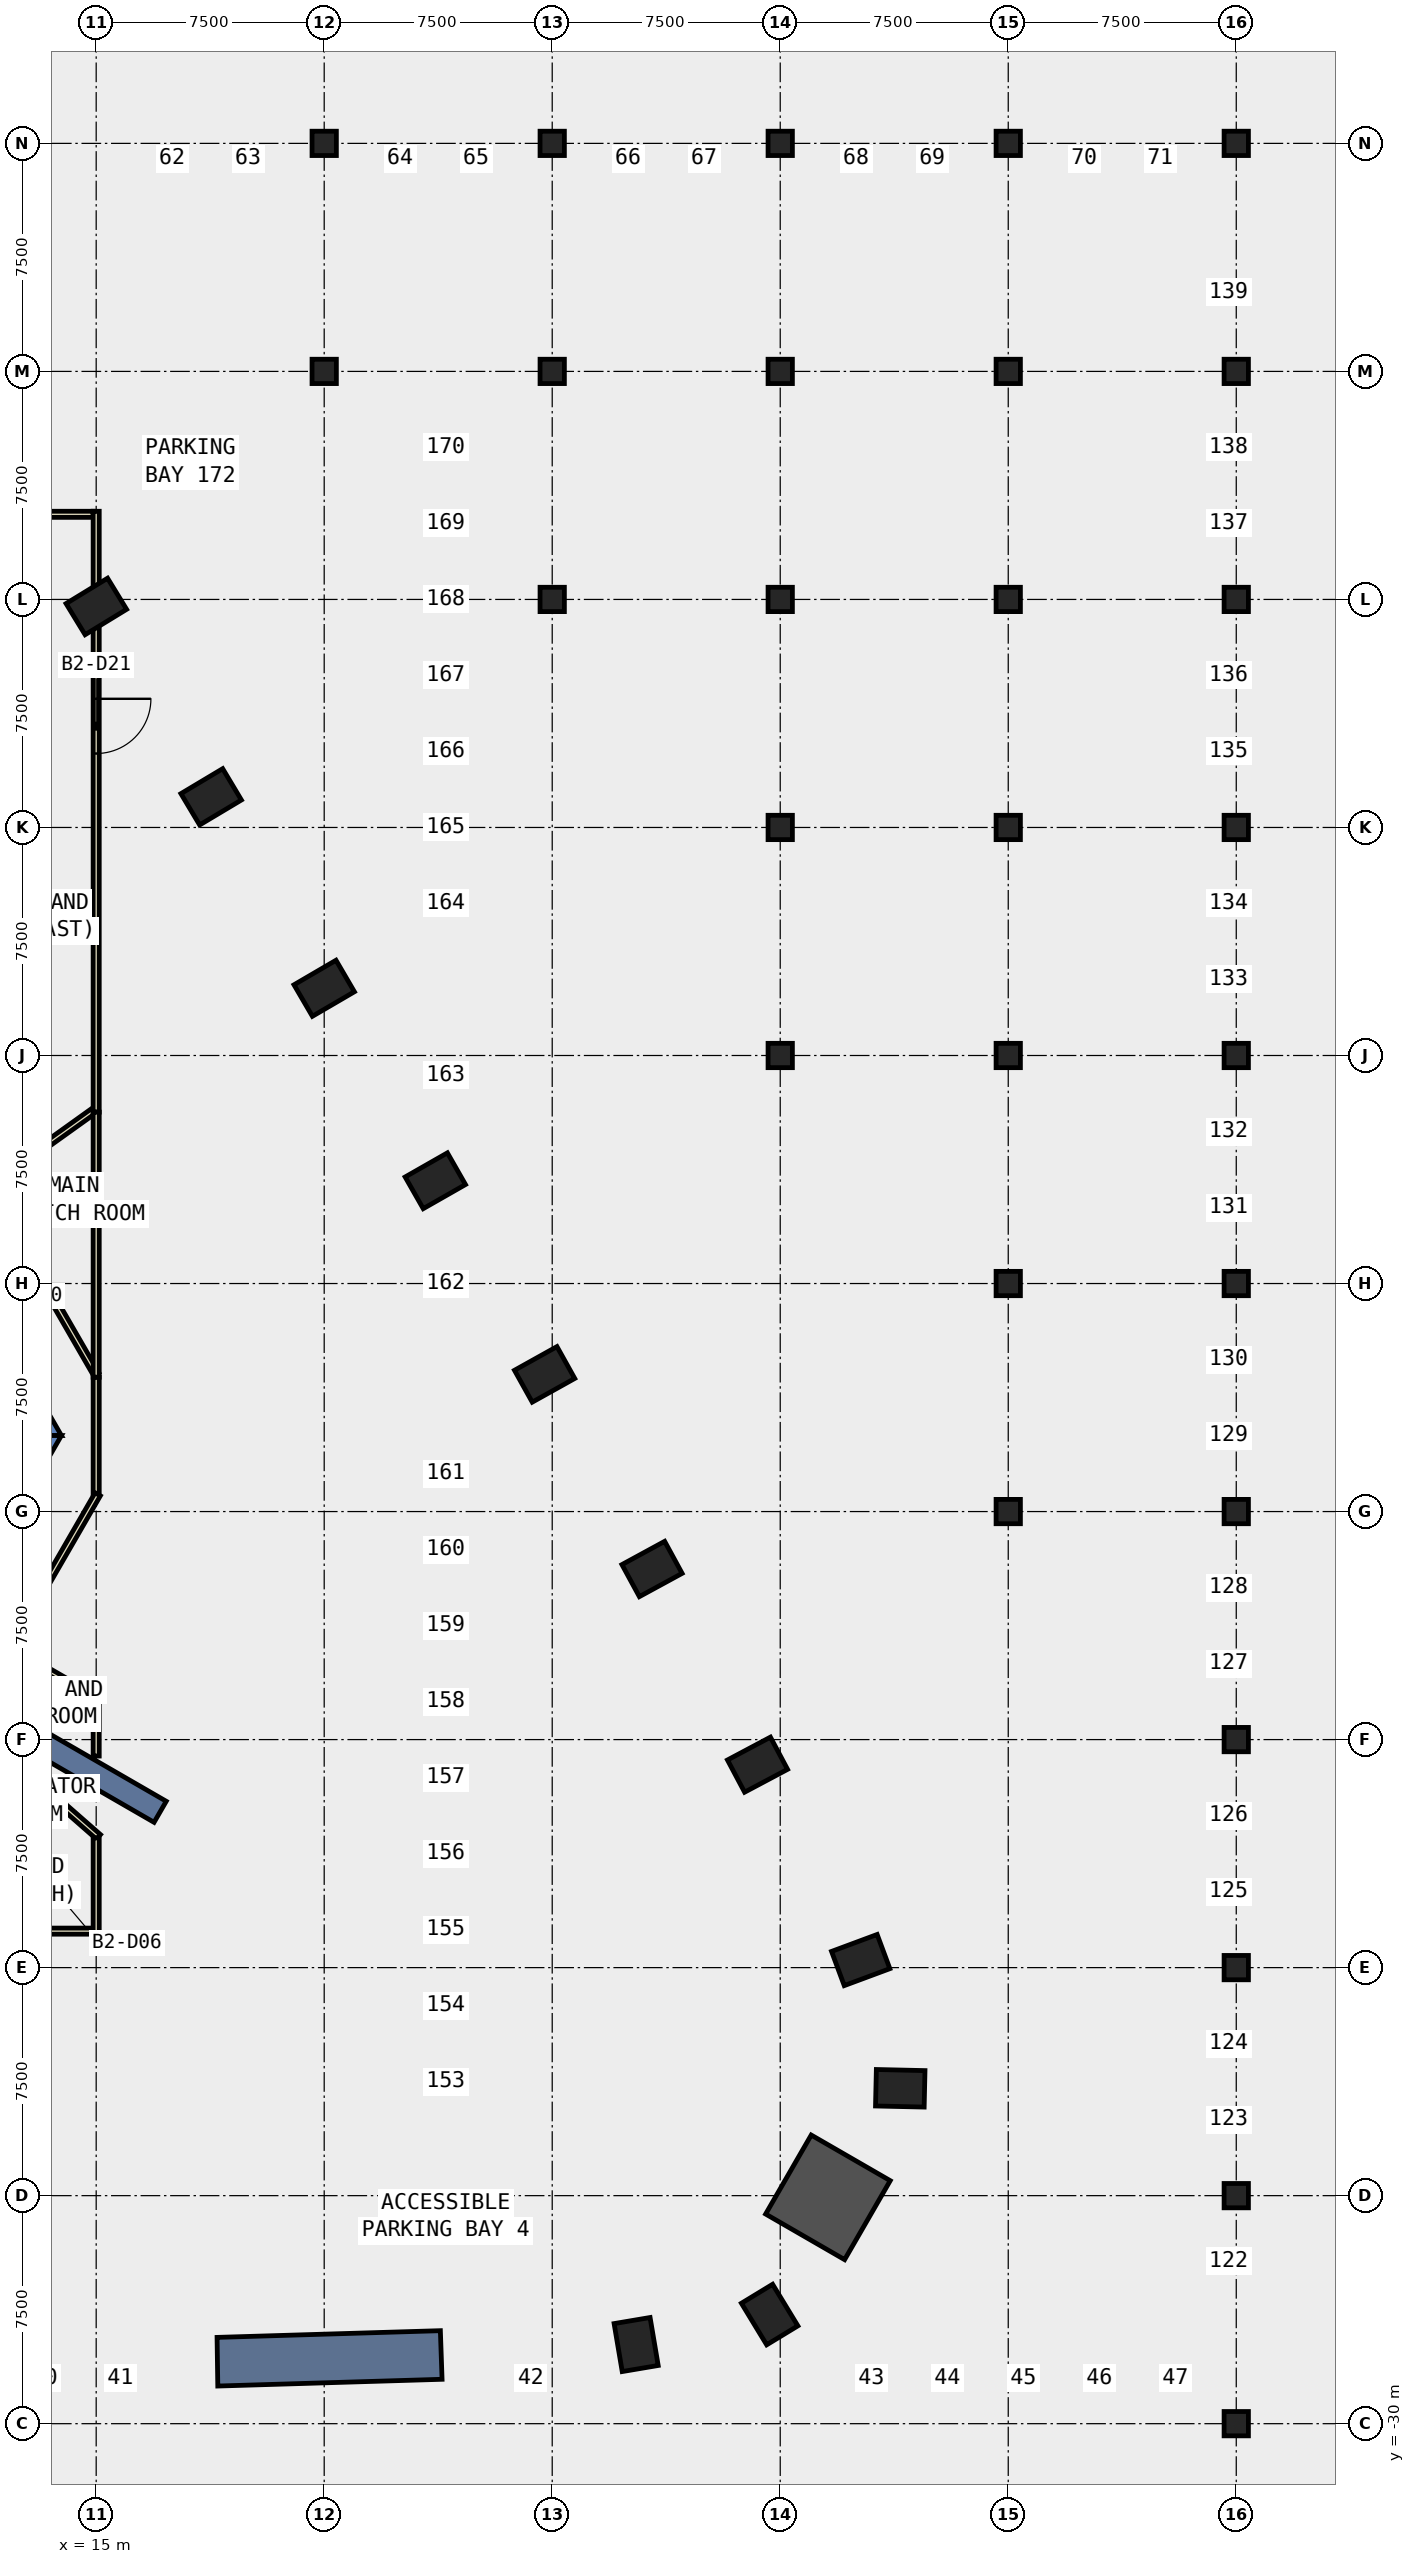
"""IFC4 building model, lengths in metres.
Left out: names, types, materials, properties, quantities, classifications, styles, units other than length and angle.
Written with IfcOpenShell. Run it as: python <this file> out.ifc"""

import sys

from ifc_helpers import new_model, si_unit, direction, frame, frame_2d, origin, origin_2d, place, context, subcontext, project, spatial, polyline, rectangle, outline, extrude, element, fill, save


model = new_model("IFC4")
c1 = context("Model", 3, precision=1e-05, world=origin(), true_north=direction((0.0, 1.0)))
c2 = subcontext(c1, "Body", "Model", "MODEL_VIEW")
j1 = project(units=[si_unit("LENGTHUNIT", "METRE"), si_unit("PLANEANGLEUNIT", "RADIAN")], contexts=[c1])
p1 = place(None, origin())
s1 = spatial("IfcSite", under=j1, at=p1, CompositionType="ELEMENT")
p2 = place(p1, origin())
s2 = spatial("IfcBuilding", under=s1, at=p2, CompositionType="ELEMENT")
p3 = place(p2, frame((0.0, 0.0, -11.0)))
s3 = spatial("IfcBuildingStorey", under=s2, at=p3, CompositionType="ELEMENT", Elevation=-11.0)
for number, where, z_axis, x_axis in (
    (1, (22.5, 37.5, -0.42), (0.0, 0.0, 1.0), (1.0, 0.0, 0.0)),
    (2, (22.5, 45.0, -0.42), (0.0, 0.0, 1.0), (1.0, 0.0, 0.0)),
    (3, (30.0, 30.0, -0.42), (0.0, 0.0, 1.0), (1.0, 0.0, 0.0)),
    (4, (30.0, 37.5, -0.42), (0.0, 0.0, 1.0), (1.0, 0.0, 0.0)),
    (5, (30.0, 45.0, -0.42), (0.0, 0.0, 1.0), (1.0, 0.0, 0.0)),
    (6, (37.5, 15.0, -0.42), (0.0, 0.0, 1.0), (1.0, 0.0, 0.0)),
    (7, (37.5, 22.5, -0.42), (0.0, 0.0, 1.0), (1.0, 0.0, 0.0)),
    (8, (37.5, 30.0, -0.42), (0.0, 0.0, 1.0), (1.0, 0.0, 0.0)),
    (9, (37.5, 37.5, -0.42), (0.0, 0.0, 1.0), (1.0, 0.0, 0.0)),
    (10, (37.5, 45.0, -0.42), (0.0, 0.0, 1.0), (1.0, 0.0, 0.0)),
    (11, (45.0, 0.0, -0.42), (0.0, 0.0, 1.0), (1.0, 0.0, 0.0)),
    (12, (45.0, 7.5, -0.42), (0.0, 0.0, 1.0), (1.0, 0.0, 0.0)),
    (13, (45.0, 15.0, -0.42), (0.0, 0.0, 1.0), (1.0, 0.0, 0.0)),
    (14, (45.0, 22.5, -0.42), (0.0, 0.0, 1.0), (1.0, 0.0, 0.0)),
    (15, (45.0, 30.0, -0.42), (0.0, 0.0, 1.0), (1.0, 0.0, 0.0)),
    (16, (45.0, 37.5, -0.42), (0.0, 0.0, 1.0), (1.0, 0.0, 0.0)),
    (17, (45.0, 45.0, -0.42), (0.0, 0.0, 1.0), (1.0, 0.0, 0.0)),
    (18, (52.5, -30.0, -0.42), (0.0, 0.0, 1.0), (1.0, 0.0, 0.0)),
    (19, (52.5, -22.5, -0.42), (0.0, 0.0, 1.0), (1.0, 0.0, 0.0)),
    (20, (52.5, -15.0, -0.42), (0.0, 0.0, 1.0), (1.0, 0.0, 0.0)),
    (21, (52.5, -7.5, -0.42), (0.0, 0.0, 1.0), (1.0, 0.0, 0.0)),
    (22, (52.5, 0.0, -0.42), (0.0, 0.0, 1.0), (1.0, 0.0, 0.0)),
    (23, (52.5, 7.5, -0.42), (0.0, 0.0, 1.0), (1.0, 0.0, 0.0)),
    (24, (52.5, 15.0, -0.42), (0.0, 0.0, 1.0), (1.0, 0.0, 0.0)),
    (25, (52.5, 22.5, -0.42), (0.0, 0.0, 1.0), (1.0, 0.0, 0.0)),
    (26, (52.5, 30.0, -0.42), (0.0, 0.0, 1.0), (1.0, 0.0, 0.0)),
    (27, (52.5, 37.5, -0.42), (0.0, 0.0, 1.0), (1.0, 0.0, 0.0)),
    (28, (52.5, 45.0, -0.42), (0.0, 0.0, 1.0), (1.0, 0.0, 0.0)),
):
    element("IfcColumn", number, at=place(p3, frame(where, z_axis=z_axis, x_axis=x_axis)), inside=s3, PredefinedType="COLUMN", context=c2, shape_type="SweptSolid", body=[
        extrude(rectangle(XDim=0.8, YDim=0.8, at=origin_2d()), origin(), (0.0, 0.0, 1.0), 5.5),
    ])
for number, where, z_axis, x_axis in (
    (29, (32.761, -27.397, -0.42), (0.0, 0.0, 1.0), (0.986, 0.167, 0.0)),
    (30, (37.152, -26.411, -0.42), (0.0, 0.0, 1.0), (0.855, 0.519, 0.0)),
):
    element("IfcColumn", number, at=place(p3, frame(where, z_axis=z_axis, x_axis=x_axis)), inside=s3, PredefinedType="COLUMN", context=c2, shape_type="SweptSolid", body=[
        extrude(rectangle(XDim=1.2, YDim=1.6, at=origin_2d()), origin(), (0.0, 0.0, 1.0), 5.5),
    ])
p4 = place(p3, frame((39.069, -22.556, -0.42), z_axis=(0.0, 0.0, 1.0), x_axis=(-0.866025403784, 0.5, 0.0)))
e31 = element("IfcColumn", 31, at=p4, inside=s3, PredefinedType="COLUMN", context=c2, shape_type="SweptSolid", body=[
    extrude(rectangle(XDim=3.0, YDim=3.0, at=origin_2d()), origin(), (0.0, 0.0, 1.0), 5.5),
])
for number, where, z_axis, x_axis in (
    (32, (41.448, -18.969, -0.42), (0.0, 0.0, 1.0), (0.023, 1.0, 0.0)),
    (33, (40.147, -14.751, -0.42), (0.0, 0.0, 1.0), (-0.348, 0.937, 0.0)),
    (34, (36.753, -8.325, -0.42), (0.0, 0.0, 1.0), (-0.469, 0.883, 0.0)),
    (35, (33.283, -1.889, -0.42), (0.0, 0.0, 1.0), (-0.478, 0.878, 0.0)),
    (36, (29.75, 4.512, -0.42), (0.0, 0.0, 1.0), (-0.487, 0.873, 0.0)),
    (37, (26.155, 10.88, -0.42), (0.0, 0.0, 1.0), (-0.496, 0.869, 0.0)),
    (38, (22.5, 17.211, -0.42), (0.0, 0.0, 1.0), (-0.504, 0.864, 0.0)),
    (39, (18.782, 23.508, -0.42), (0.0, 0.0, 1.0), (-0.513, 0.858, 0.0)),
    (40, (15.005, 29.769, -0.42), (0.0, 0.0, 1.0), (-0.522, 0.853, 0.0)),
):
    element("IfcColumn", number, at=place(p3, frame(where, z_axis=z_axis, x_axis=x_axis)), inside=s3, PredefinedType="COLUMN", context=c2, shape_type="SweptSolid", body=[
        extrude(rectangle(XDim=1.2, YDim=1.6, at=origin_2d()), origin(), (0.0, 0.0, 1.0), 5.5),
    ])
p5 = place(p3, frame((0.0, 0.0, -0.42)))
e41 = element("IfcWall", 41, at=p5, inside=s3, PredefinedType="SHEAR", context=c2, shape_type="SweptSolid", body=[
    extrude(outline(polyline([(19.0, -28.762), (26.377, -28.54), (26.321, -26.941), (18.976, -27.162), (19.0, -28.762)])), origin(), (0.0, 0.0, 1.0), 5.5),
])
p6 = place(p3, frame((0.0, 0.0, -0.42)))
e42 = element("IfcWall", 42, at=p6, inside=s3, PredefinedType="SHEAR", context=c2, shape_type="SweptSolid", body=[
    extrude(outline(polyline([(8.517, 11.748), (7.651, 11.248), (12.702, 2.5), (13.856, 2.5), (8.517, 11.748)])), origin(), (0.0, 0.0, 1.0), 5.5),
])
p7 = place(p3, frame((0.0, 0.0, -0.42)))
e43 = element("IfcWall", 43, at=p7, inside=s3, PredefinedType="SHEAR", context=c2, shape_type="SweptSolid", body=[
    extrude(outline(polyline([(6.928, -9.5), (13.856, 2.5), (12.702, 2.5), (6.351, -8.5), (6.928, -9.5)])), origin(), (0.0, 0.0, 1.0), 5.5),
])
p8 = place(p3, frame((9.31, -5.375, -0.42), z_axis=(0.0, 0.0, 1.0), x_axis=(0.866017533419, -0.500013631625, 0.0)))
e44 = element("IfcWall", 44, at=p8, inside=s3, PredefinedType="SHEAR", context=c2, shape_type="SweptSolid", body=[
    extrude(rectangle(XDim=9.0, YDim=0.8, at=frame_2d((4.5, 0.0))), origin(), (0.0, 0.0, 1.0), 5.5),
])
p9 = place(p3, frame((14.9, -13.8, 0.0), z_axis=(0.0, 0.0, 1.0), x_axis=(-1.0, 0.0, 0.0)))
e45 = element("IfcWall", 45, at=p9, inside=s3, PredefinedType="PARTITIONING", context=c2, shape_type="SweptSolid", body=[
    extrude(rectangle(XDim=2.249, YDim=0.2, at=frame_2d((1.125, 0.0))), origin(), (0.0, 0.0, 1.0), 5.05),
])
p10 = place(p3, frame((10.663, -6.835, 0.0), z_axis=(0.0, 0.0, 1.0), x_axis=(0.752269740493, -0.658855247788, 0.0)))
e46 = element("IfcWall", 46, at=p10, inside=s3, PredefinedType="PARTITIONING", context=c2, shape_type="SweptSolid", body=[
    extrude(rectangle(XDim=5.865, YDim=0.2, at=frame_2d((2.932, 0.0))), origin(), (0.0, 0.0, 1.0), 5.05),
])
p11 = place(p3, frame((15.0, -10.733, 0.0), z_axis=(0.0, 0.0, 1.0), x_axis=(0.0, -1.0, 0.0)))
e47 = element("IfcWall", 47, at=p11, inside=s3, PredefinedType="PARTITIONING", context=c2, shape_type="SweptSolid", body=[
    extrude(rectangle(XDim=3.167, YDim=0.2, at=frame_2d((1.583, 0.0))), origin(), (0.0, 0.0, 1.0), 5.05),
])
p12 = place(p3, frame((12.124, -4.5, 0.0), z_axis=(0.0, 0.0, 1.0), x_axis=(0.866109535743, -0.499854250852, 0.0)))
e48 = element("IfcWall", 48, at=p12, inside=s3, PredefinedType="PARTITIONING", context=c2, shape_type="SweptSolid", body=[
    extrude(rectangle(XDim=3.421, YDim=0.2, at=frame_2d((1.71, 0.0))), origin(), (0.0, 0.0, 1.0), 5.05),
])
p13 = place(p3, frame((15.0, -6.26, 0.0), z_axis=(0.0, 0.0, 1.0), x_axis=(0.0, -1.0, 0.0)))
e49 = element("IfcWall", 49, at=p13, inside=s3, PredefinedType="PARTITIONING", context=c2, shape_type="SweptSolid", body=[
    extrude(rectangle(XDim=1.781, YDim=0.2, at=frame_2d((0.891, 0.0))), origin(), (0.0, 0.0, 1.0), 5.05),
])
p14 = place(p3, frame((11.499, 10.583, 0.0), z_axis=(0.0, 0.0, 1.0), x_axis=(0.499994090379, -0.866028815679, 0.0)))
e50 = element("IfcWall", 50, at=p14, inside=s3, PredefinedType="PARTITIONING", context=c2, shape_type="SweptSolid", body=[
    extrude(rectangle(XDim=7.002, YDim=0.2, at=frame_2d((3.501, 0.0))), origin(), (0.0, 0.0, 1.0), 5.05),
])
p15 = place(p14, frame((1.952, 0.0, 0.0)))
e51 = element("IfcOpeningElement", 51, at=p15, cuts=e50, PredefinedType="OPENING", context=c2, shape_type="SweptSolid", body=[
    extrude(rectangle(XDim=1.0, YDim=2.1, at=frame_2d((0.5, 1.05))), frame((0.0, 0.11, 0.0), z_axis=(0.0, -1.0, 0.0), x_axis=(1.0, 0.0, 0.0)), (0.0, 0.0, 1.0), 0.22),
])
p16 = place(p3, frame((15.0, 4.419, 0.0), z_axis=(0.0, 0.0, 1.0), x_axis=(0.0, -1.0, 0.0)))
e52 = element("IfcWall", 52, at=p16, inside=s3, PredefinedType="PARTITIONING", context=c2, shape_type="SweptSolid", body=[
    extrude(rectangle(XDim=3.838, YDim=0.2, at=frame_2d((1.919, 0.0))), origin(), (0.0, 0.0, 1.0), 5.05),
])
p17 = place(p3, frame((15.05, 0.568, 0.0), z_axis=(0.0, 0.0, 1.0), x_axis=(-0.500047946832, -0.865997719899, 0.0)))
e53 = element("IfcWall", 53, at=p17, inside=s3, PredefinedType="PARTITIONING", context=c2, shape_type="SweptSolid", body=[
    extrude(rectangle(XDim=5.952, YDim=0.2, at=frame_2d((2.976, 0.0))), origin(), (0.0, 0.0, 1.0), 5.05),
])
p18 = place(p3, frame((14.919, 13.18, 0.0), z_axis=(0.0, 0.0, 1.0), x_axis=(-0.81313339858, -0.582077379833, 0.0)))
e54 = element("IfcWall", 54, at=p18, inside=s3, PredefinedType="PARTITIONING", context=c2, shape_type="SweptSolid", body=[
    extrude(rectangle(XDim=3.879, YDim=0.2, at=frame_2d((1.939, 0.0))), origin(), (0.0, 0.0, 1.0), 5.05),
])
p19 = place(p3, frame((12.59, 32.8, 0.0), z_axis=(0.0, 0.0, 1.0), x_axis=(1.0, 0.0, 0.0)))
e55 = element("IfcWall", 55, at=p19, inside=s3, PredefinedType="PARTITIONING", context=c2, shape_type="SweptSolid", body=[
    extrude(rectangle(XDim=2.31, YDim=0.2, at=frame_2d((1.155, 0.0))), origin(), (0.0, 0.0, 1.0), 5.05),
])
p20 = place(p3, frame((15.0, 32.9, 0.0), z_axis=(0.0, 0.0, 1.0), x_axis=(0.0, -1.0, 0.0)))
e56 = element("IfcWall", 56, at=p20, inside=s3, PredefinedType="PARTITIONING", context=c2, shape_type="SweptSolid", body=[
    extrude(rectangle(XDim=19.762, YDim=0.2, at=frame_2d((9.881, 0.0))), origin(), (0.0, 0.0, 1.0), 5.05),
])
p21 = place(p20, frame((6.168, 0.0, 0.0)))
e57 = element("IfcOpeningElement", 57, at=p21, cuts=e56, PredefinedType="OPENING", context=c2, shape_type="SweptSolid", body=[
    extrude(rectangle(XDim=1.8, YDim=2.1, at=frame_2d((0.9, 1.05))), frame((0.0, 0.11, 0.0), z_axis=(0.0, -1.0, 0.0), x_axis=(1.0, 0.0, 0.0)), (0.0, 0.0, 1.0), 0.22),
])
p22 = place(p3, frame((15.0, 13.138, 0.0), z_axis=(0.0, 0.0, 1.0), x_axis=(0.0, -1.0, 0.0)))
e58 = element("IfcWall", 58, at=p22, inside=s3, PredefinedType="PARTITIONING", context=c2, shape_type="SweptSolid", body=[
    extrude(rectangle(XDim=8.719, YDim=0.2, at=frame_2d((4.359, 0.0))), origin(), (0.0, 0.0, 1.0), 5.05),
])
p23 = place(p21, origin())
e59 = element("IfcDoor", 59, at=p23, inside=s3, OperationType="DOUBLE_DOOR_SINGLE_SWING", PredefinedType="DOOR", context=c2, shape_type="SweptSolid", body=[
    extrude(rectangle(XDim=1.8, YDim=2.1, at=frame_2d((0.9, 1.05))), frame((0.0, 0.025, 0.0), z_axis=(0.0, -1.0, 0.0), x_axis=(1.0, 0.0, 0.0)), (0.0, 0.0, 1.0), 0.05),
])
fill(e57, e59)
save(model, sys.argv[1])
